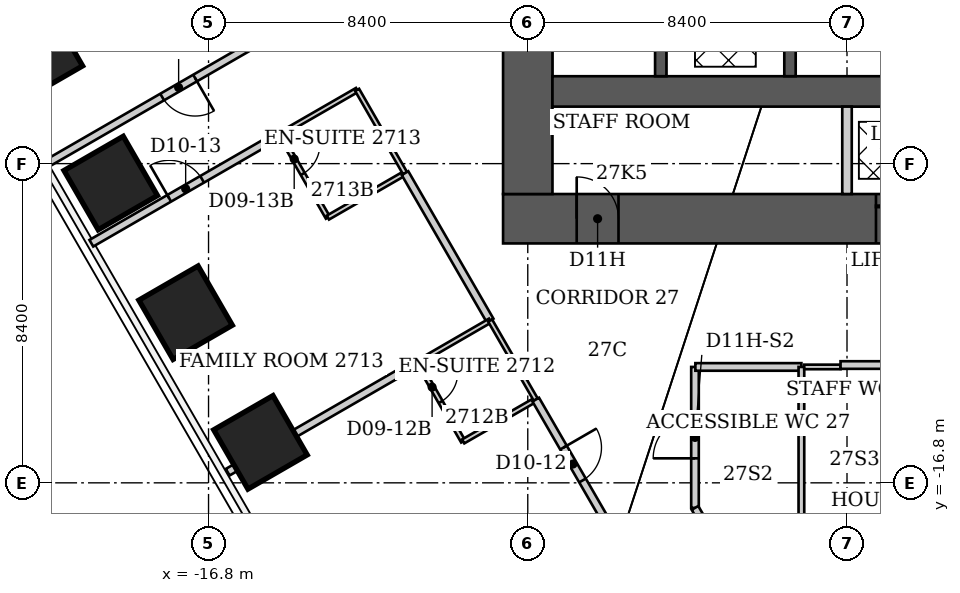
"""IFC4 building model, lengths in metres.
Left out: names, types, materials, properties, quantities, classifications, styles, units other than length and angle.
Written with IfcOpenShell. Run it as: python <this file> out.ifc"""

import sys

from ifc_helpers import new_model, si_unit, direction, frame, frame_2d, origin, origin_2d, place, context, subcontext, project, spatial, rectangle, extrude, element, fill, save


model = new_model("IFC4")
c1 = context("Model", 3, precision=1e-05, world=origin(), true_north=direction((0.0, 1.0)))
c2 = subcontext(c1, "Body", "Model", "MODEL_VIEW")
j1 = project(units=[si_unit("LENGTHUNIT", "METRE"), si_unit("PLANEANGLEUNIT", "RADIAN")], contexts=[c1])
p1 = place(None, origin())
s1 = spatial("IfcSite", under=j1, at=p1, CompositionType="ELEMENT")
p2 = place(p1, origin())
s2 = spatial("IfcBuilding", under=s1, at=p2, CompositionType="ELEMENT")
p3 = place(p2, frame((0.0, 0.0, 112.0)))
s3 = spatial("IfcBuildingStorey", under=s2, at=p3, CompositionType="ELEMENT", Elevation=112.0)
for number, where, z_axis, x_axis in (
    (1, (-15.434, -15.735, 0.0), (0.0, 0.0, 1.0), (-0.866, -0.5, 0.0)),
    (2, (-17.404, -12.323, 0.0), (0.0, 0.0, 1.0), (-0.866, -0.5, 0.0)),
    (3, (-19.374, -8.911, 0.0), (0.0, 0.0, 1.0), (-0.866, -0.5, 0.0)),
    (4, (-21.344, -5.499, 0.0), (0.0, 0.0, 1.0), (-0.866, -0.5, 0.0)),
):
    element("IfcColumn", number, at=place(p3, frame(where, z_axis=z_axis, x_axis=x_axis)), inside=s3, PredefinedType="COLUMN", context=c2, shape_type="SweptSolid", body=[
        extrude(rectangle(XDim=1.8, YDim=1.8, at=origin_2d()), origin(), (0.0, 0.0, 1.0), 3.8),
    ])
p4 = place(p3, frame((-9.05, -9.85, 0.0), z_axis=(0.0, 0.0, 1.0), x_axis=(1.0, 0.0, 0.0)))
e5 = element("IfcWall", 5, at=p4, inside=s3, PredefinedType="SHEAR", context=c2, shape_type="SweptSolid", body=[
    extrude(rectangle(XDim=18.1, YDim=1.3, at=frame_2d((9.05, 0.0))), origin(), (0.0, 0.0, 1.0), 3.8),
])
p5 = place(p4, frame((1.938, 0.0, 0.0)))
e6 = element("IfcOpeningElement", 6, at=p5, cuts=e5, PredefinedType="OPENING", context=c2, shape_type="SweptSolid", body=[
    extrude(rectangle(XDim=1.1, YDim=2.2, at=frame_2d((0.55, 1.1))), frame((0.0, 0.65, 0.0), z_axis=(0.0, -1.0, 0.0), x_axis=(1.0, 0.0, 0.0)), (0.0, 0.0, 1.0), 1.3),
])
p6 = place(p4, frame((9.812, 0.0, 0.0)))
e7 = element("IfcOpeningElement", 7, at=p6, cuts=e5, PredefinedType="OPENING", context=c2, shape_type="SweptSolid", body=[
    extrude(rectangle(XDim=1.1, YDim=2.1, at=frame_2d((0.55, 1.05))), frame((0.0, 0.65, 0.0), z_axis=(0.0, -1.0, 0.0), x_axis=(1.0, 0.0, 0.0)), (0.0, 0.0, 1.0), 1.3),
])
p7 = place(p4, frame((12.438, 0.0, 0.0)))
e8 = element("IfcOpeningElement", 8, at=p7, cuts=e5, PredefinedType="OPENING", context=c2, shape_type="SweptSolid", body=[
    extrude(rectangle(XDim=1.1, YDim=2.1, at=frame_2d((0.55, 1.05))), frame((0.0, 0.65, 0.0), z_axis=(0.0, -1.0, 0.0), x_axis=(1.0, 0.0, 0.0)), (0.0, 0.0, 1.0), 1.3),
])
p8 = place(p4, frame((15.062, 0.0, 0.0)))
e9 = element("IfcOpeningElement", 9, at=p8, cuts=e5, PredefinedType="OPENING", context=c2, shape_type="SweptSolid", body=[
    extrude(rectangle(XDim=1.1, YDim=2.1, at=frame_2d((0.55, 1.05))), frame((0.0, 0.65, 0.0), z_axis=(0.0, -1.0, 0.0), x_axis=(1.0, 0.0, 0.0)), (0.0, 0.0, 1.0), 1.3),
])
p9 = place(p3, frame((-8.4, -9.2, 0.0), z_axis=(0.0, 0.0, 1.0), x_axis=(0.0, 1.0, 0.0)))
e10 = element("IfcWall", 10, at=p9, inside=s3, PredefinedType="SHEAR", context=c2, shape_type="SweptSolid", body=[
    extrude(rectangle(XDim=15.3, YDim=1.3, at=frame_2d((7.65, 0.0))), origin(), (0.0, 0.0, 1.0), 3.8),
])
p10 = place(p9, frame((10.7, 0.0, 0.0)))
e11 = element("IfcOpeningElement", 11, at=p10, cuts=e10, PredefinedType="OPENING", context=c2, shape_type="SweptSolid", body=[
    extrude(rectangle(XDim=1.2, YDim=2.2, at=frame_2d((0.6, 1.1))), frame((0.0, 0.65, 0.0), z_axis=(0.0, -1.0, 0.0), x_axis=(1.0, 0.0, 0.0)), (0.0, 0.0, 1.0), 1.3),
])
p11 = place(p3, frame((-7.75, -6.5, 0.0), z_axis=(0.0, 0.0, 1.0), x_axis=(1.0, 0.0, 0.0)))
e12 = element("IfcWall", 12, at=p11, inside=s3, PredefinedType="SHEAR", context=c2, shape_type="SweptSolid", body=[
    extrude(rectangle(XDim=15.5, YDim=0.8, at=frame_2d((7.75, 0.0))), origin(), (0.0, 0.0, 1.0), 3.8),
])
for number, where, z_axis, x_axis in (
    (13, (-4.9, -6.1, 0.0), (0.0, 0.0, 1.0), (0.0, 1.0, 0.0)),
    (14, (-1.5, -6.1, 0.0), (0.0, 0.0, 1.0), (0.0, 1.0, 0.0)),
):
    element("IfcWall", number, at=place(p3, frame(where, z_axis=z_axis, x_axis=x_axis)), inside=s3, PredefinedType="SHEAR", context=c2, shape_type="SweptSolid", body=[
        extrude(rectangle(XDim=7.2, YDim=0.3, at=frame_2d((3.6, 0.0))), origin(), (0.0, 0.0, 1.0), 3.8),
    ])
p12 = place(p3, frame((0.0, -9.2, 0.0), z_axis=(0.0, 0.0, 1.0), x_axis=(0.0, 1.0, 0.0)))
e15 = element("IfcWall", 15, at=p12, inside=s3, PredefinedType="PARTITIONING", context=c2, shape_type="SweptSolid", body=[
    extrude(rectangle(XDim=2.3, YDim=0.25, at=frame_2d((1.15, 0.0))), origin(), (0.0, 0.0, 1.0), 3.8),
])
p13 = place(p3, frame((-19.884, -10.495, 0.0), z_axis=(0.0, 0.0, 1.0), x_axis=(0.86608558139, 0.499895754841, 0.0)))
e16 = element("IfcWall", 16, at=p13, inside=s3, PredefinedType="PARTITIONING", context=c2, shape_type="SweptSolid", body=[
    extrude(rectangle(XDim=5.732, YDim=0.2, at=frame_2d((2.866, 0.0))), origin(), (0.0, 0.0, 1.0), 3.64),
])
p14 = place(p13, frame((2.366, 0.0, 0.0)))
e17 = element("IfcOpeningElement", 17, at=p14, cuts=e16, PredefinedType="OPENING", context=c2, shape_type="SweptSolid", body=[
    extrude(rectangle(XDim=1.0, YDim=2.13, at=frame_2d((0.5, 1.065))), frame((0.0, 0.1, 0.0), z_axis=(0.0, -1.0, 0.0), x_axis=(1.0, 0.0, 0.0)), (0.0, 0.0, 1.0), 0.2),
])
p15 = place(p3, frame((-16.296, -16.52, 0.0), z_axis=(0.0, 0.0, 1.0), x_axis=(0.866035778077, 0.499982030767, 0.0)))
e18 = element("IfcWall", 18, at=p15, inside=s3, PredefinedType="PARTITIONING", context=c2, shape_type="SweptSolid", body=[
    extrude(rectangle(XDim=5.781, YDim=0.2, at=frame_2d((2.89, 0.0))), origin(), (0.0, 0.0, 1.0), 3.64),
])
p16 = place(p3, frame((-14.92, -7.63, 0.0), z_axis=(0.0, 0.0, 1.0), x_axis=(0.498665353881, -0.866794592068, 0.0)))
e19 = element("IfcWall", 19, at=p16, inside=s3, PredefinedType="PARTITIONING", context=c2, shape_type="SweptSolid", body=[
    extrude(rectangle(XDim=2.527, YDim=0.12, at=frame_2d((1.263, 0.0))), origin(), (0.0, 0.0, 1.0), 3.64),
])
p17 = place(p16, frame((0.3, 0.0, 0.0)))
e20 = element("IfcOpeningElement", 20, at=p17, cuts=e19, PredefinedType="OPENING", context=c2, shape_type="SweptSolid", body=[
    extrude(rectangle(XDim=0.9, YDim=2.03, at=frame_2d((0.45, 1.015))), frame((0.0, 0.06, 0.0), z_axis=(0.0, -1.0, 0.0), x_axis=(1.0, 0.0, 0.0)), (0.0, 0.0, 1.0), 0.12),
])
p18 = place(p3, frame((-14.92, -7.63, 0.0), z_axis=(0.0, 0.0, 1.0), x_axis=(0.866390229467, 0.499367570316, 0.0)))
e21 = element("IfcWall", 21, at=p18, inside=s3, PredefinedType="PARTITIONING", context=c2, shape_type="SweptSolid", body=[
    extrude(rectangle(XDim=2.343, YDim=0.12, at=frame_2d((1.171, 0.0))), origin(), (0.0, 0.0, 1.0), 3.64),
])
p19 = place(p3, frame((-14.09, -4.38, 0.0), z_axis=(0.0, 0.0, 1.0), x_axis=(-0.866174008169, -0.499742521277, 0.0)))
e22 = element("IfcWall", 22, at=p19, inside=s3, PredefinedType="PARTITIONING", context=c2, shape_type="SweptSolid", body=[
    extrude(rectangle(XDim=8.074, YDim=0.2, at=frame_2d((4.037, 0.0))), origin(), (0.0, 0.0, 1.0), 3.64),
])
p20 = place(p19, frame((3.537, 0.0, 0.0)))
e23 = element("IfcOpeningElement", 23, at=p20, cuts=e22, PredefinedType="OPENING", context=c2, shape_type="SweptSolid", body=[
    extrude(rectangle(XDim=1.0, YDim=2.13, at=frame_2d((0.5, 1.065))), frame((0.0, 0.1, 0.0), z_axis=(0.0, -1.0, 0.0), x_axis=(1.0, 0.0, 0.0)), (0.0, 0.0, 1.0), 0.2),
])
p21 = place(p3, frame((-13.66, -9.82, 0.0), z_axis=(0.0, 0.0, 1.0), x_axis=(0.866345142729, 0.499445786517, 0.0)))
e24 = element("IfcWall", 24, at=p21, inside=s3, PredefinedType="PARTITIONING", context=c2, shape_type="SweptSolid", body=[
    extrude(rectangle(XDim=2.343, YDim=0.12, at=frame_2d((1.171, 0.0))), origin(), (0.0, 0.0, 1.0), 3.64),
])
p22 = place(p3, frame((-12.89, -6.46, 0.0), z_axis=(0.0, 0.0, 1.0), x_axis=(0.498707120669, -0.866770562372, 0.0)))
e25 = element("IfcWall", 25, at=p22, inside=s3, PredefinedType="PARTITIONING", context=c2, shape_type="SweptSolid", body=[
    extrude(rectangle(XDim=2.527, YDim=0.12, at=frame_2d((1.263, 0.0))), origin(), (0.0, 0.0, 1.0), 3.64),
])
p23 = place(p3, frame((-11.63, -8.65, 0.0), z_axis=(0.0, 0.0, 1.0), x_axis=(0.499966166967, -0.866044936414, 0.0)))
e26 = element("IfcWall", 26, at=p23, inside=s3, PredefinedType="PARTITIONING", context=c2, shape_type="SweptSolid", body=[
    extrude(rectangle(XDim=4.48, YDim=0.2, at=frame_2d((2.24, 0.0))), origin(), (0.0, 0.0, 1.0), 3.64),
])
p24 = place(p3, frame((-11.29, -13.63, 0.0), z_axis=(0.0, 0.0, 1.0), x_axis=(0.496555799318, -0.868004803076, 0.0)))
e27 = element("IfcWall", 27, at=p24, inside=s3, PredefinedType="PARTITIONING", context=c2, shape_type="SweptSolid", body=[
    extrude(rectangle(XDim=2.396, YDim=0.12, at=frame_2d((1.198, 0.0))), origin(), (0.0, 0.0, 1.0), 3.64),
])
p25 = place(p24, frame((0.3, 0.0, 0.0)))
e28 = element("IfcOpeningElement", 28, at=p25, cuts=e27, PredefinedType="OPENING", context=c2, shape_type="SweptSolid", body=[
    extrude(rectangle(XDim=0.9, YDim=2.03, at=frame_2d((0.45, 1.015))), frame((0.0, 0.06, 0.0), z_axis=(0.0, -1.0, 0.0), x_axis=(1.0, 0.0, 0.0)), (0.0, 0.0, 1.0), 0.12),
])
p26 = place(p3, frame((-11.29, -13.63, 0.0), z_axis=(0.0, 0.0, 1.0), x_axis=(0.865444051011, 0.501005583372, 0.0)))
e29 = element("IfcWall", 29, at=p26, inside=s3, PredefinedType="PARTITIONING", context=c2, shape_type="SweptSolid", body=[
    extrude(rectangle(XDim=2.195, YDim=0.12, at=frame_2d((1.098, 0.0))), origin(), (0.0, 0.0, 1.0), 3.64),
])
p27 = place(p3, frame((-10.1, -15.71, 0.0), z_axis=(0.0, 0.0, 1.0), x_axis=(0.866609394187, 0.498987132006, 0.0)))
e30 = element("IfcWall", 30, at=p27, inside=s3, PredefinedType="PARTITIONING", context=c2, shape_type="SweptSolid", body=[
    extrude(rectangle(XDim=2.204, YDim=0.12, at=frame_2d((1.102, 0.0))), origin(), (0.0, 0.0, 1.0), 3.64),
])
p28 = place(p3, frame((-9.39, -12.53, 0.0), z_axis=(0.0, 0.0, 1.0), x_axis=(0.499737123639, -0.866177122335, 0.0)))
e31 = element("IfcWall", 31, at=p28, inside=s3, PredefinedType="PARTITIONING", context=c2, shape_type="SweptSolid", body=[
    extrude(rectangle(XDim=2.401, YDim=0.12, at=frame_2d((1.201, 0.0))), origin(), (0.0, 0.0, 1.0), 3.64),
])
p29 = place(p3, frame((-8.19, -14.61, 0.0), z_axis=(0.0, 0.0, 1.0), x_axis=(0.50053726643, -0.86571499058, 0.0)))
e32 = element("IfcWall", 32, at=p29, inside=s3, PredefinedType="PARTITIONING", context=c2, shape_type="SweptSolid", body=[
    extrude(rectangle(XDim=3.916, YDim=0.2, at=frame_2d((1.958, 0.0))), origin(), (0.0, 0.0, 1.0), 3.64),
])
p30 = place(p29, frame((1.458, 0.0, 0.0)))
e33 = element("IfcOpeningElement", 33, at=p30, cuts=e32, PredefinedType="OPENING", context=c2, shape_type="SweptSolid", body=[
    extrude(rectangle(XDim=1.0, YDim=2.13, at=frame_2d((0.5, 1.065))), frame((0.0, 0.1, 0.0), z_axis=(0.0, -1.0, 0.0), x_axis=(1.0, 0.0, 0.0)), (0.0, 0.0, 1.0), 0.2),
])
p31 = place(p3, frame((-4.0, -17.46, 0.0), z_axis=(0.0, 0.0, 1.0), x_axis=(0.0, 1.0, 0.0)))
e34 = element("IfcWall", 34, at=p31, inside=s3, PredefinedType="PARTITIONING", context=c2, shape_type="SweptSolid", body=[
    extrude(rectangle(XDim=3.71, YDim=0.2, at=frame_2d((1.855, 0.0))), origin(), (0.0, 0.0, 1.0), 2.878),
])
p32 = place(p31, frame((1.305, 0.0, 0.0)))
e35 = element("IfcOpeningElement", 35, at=p32, cuts=e34, PredefinedType="OPENING", context=c2, shape_type="SweptSolid", body=[
    extrude(rectangle(XDim=1.1, YDim=2.2, at=frame_2d((0.55, 1.1))), frame((0.0, 0.1, 0.0), z_axis=(0.0, -1.0, 0.0), x_axis=(1.0, 0.0, 0.0)), (0.0, 0.0, 1.0), 0.2),
])
p33 = place(p3, frame((-3.99, -13.75, 0.0), z_axis=(0.0, 0.0, 1.0), x_axis=(1.0, 0.0, 0.0)))
e36 = element("IfcWall", 36, at=p33, inside=s3, PredefinedType="PARTITIONING", context=c2, shape_type="SweptSolid", body=[
    extrude(rectangle(XDim=2.79, YDim=0.2, at=frame_2d((1.395, 0.0))), origin(), (0.0, 0.0, 1.0), 3.64),
])
p34 = place(p3, frame((-3.75, -17.89, 0.0), z_axis=(0.0, 0.0, 1.0), x_axis=(-0.502680181512, 0.864472460588, 0.0)))
e37 = element("IfcWall", 37, at=p34, inside=s3, PredefinedType="PARTITIONING", context=c2, shape_type="SweptSolid", body=[
    extrude(rectangle(XDim=0.497, YDim=0.2, at=frame_2d((0.249, 0.0))), origin(), (0.0, 0.0, 1.0), 3.64),
])
p35 = place(p3, frame((-1.2, -13.75, 0.0), z_axis=(0.0, 0.0, 1.0), x_axis=(0.0, -1.0, 0.0)))
e38 = element("IfcWall", 38, at=p35, inside=s3, PredefinedType="PARTITIONING", context=c2, shape_type="SweptSolid", body=[
    extrude(rectangle(XDim=4.14, YDim=0.15, at=frame_2d((2.07, 0.0))), origin(), (0.0, 0.0, 1.0), 3.64),
])
p36 = place(p3, frame((-1.125, -13.75, 0.0), z_axis=(0.0, 0.0, 1.0), x_axis=(1.0, 0.0, 0.0)))
e39 = element("IfcWall", 39, at=p36, inside=s3, PredefinedType="PARTITIONING", context=c2, shape_type="SweptSolid", body=[
    extrude(rectangle(XDim=0.955, YDim=0.12, at=frame_2d((0.478, 0.0))), origin(), (0.0, 0.0, 1.0), 3.64),
])
p37 = place(p3, frame((8.538, -13.7, 0.0), z_axis=(0.0, 0.0, 1.0), x_axis=(-1.0, 0.0, 0.0)))
e40 = element("IfcWall", 40, at=p37, inside=s3, PredefinedType="PARTITIONING", context=c2, shape_type="SweptSolid", body=[
    extrude(rectangle(XDim=8.708, YDim=0.2, at=frame_2d((4.354, 0.0))), origin(), (0.0, 0.0, 1.0), 3.64),
])
p38 = place(p37, frame((3.804, 0.0, 0.0)))
e41 = element("IfcOpeningElement", 41, at=p38, cuts=e40, PredefinedType="OPENING", context=c2, shape_type="SweptSolid", body=[
    extrude(rectangle(XDim=1.1, YDim=2.2, at=frame_2d((0.55, 1.1))), frame((0.0, 0.1, 0.0), z_axis=(0.0, -1.0, 0.0), x_axis=(1.0, 0.0, 0.0)), (0.0, 0.0, 1.0), 0.2),
])
p39 = place(p30, origin())
e42 = element("IfcDoor", 42, at=p39, inside=s3, OperationType="SINGLE_SWING_LEFT", PredefinedType="DOOR", context=c2, shape_type="SweptSolid", body=[
    extrude(rectangle(XDim=1.0, YDim=2.13, at=frame_2d((0.5, 1.065))), frame((0.0, 0.025, 0.0), z_axis=(0.0, -1.0, 0.0), x_axis=(1.0, 0.0, 0.0)), (0.0, 0.0, 1.0), 0.05),
])
fill(e33, e42)
p40 = place(p25, origin())
e43 = element("IfcDoor", 43, at=p40, inside=s3, OperationType="SINGLE_SWING_LEFT", PredefinedType="DOOR", context=c2, shape_type="SweptSolid", body=[
    extrude(rectangle(XDim=0.9, YDim=2.03, at=frame_2d((0.45, 1.015))), frame((0.0, 0.025, 0.0), z_axis=(0.0, -1.0, 0.0), x_axis=(1.0, 0.0, 0.0)), (0.0, 0.0, 1.0), 0.05),
])
fill(e28, e43)
p41 = place(p14, origin())
e44 = element("IfcDoor", 44, at=p41, inside=s3, OperationType="SINGLE_SWING_LEFT", PredefinedType="DOOR", context=c2, shape_type="SweptSolid", body=[
    extrude(rectangle(XDim=1.0, YDim=2.13, at=frame_2d((0.5, 1.065))), frame((0.0, 0.025, 0.0), z_axis=(0.0, -1.0, 0.0), x_axis=(1.0, 0.0, 0.0)), (0.0, 0.0, 1.0), 0.05),
])
fill(e17, e44)
p42 = place(p17, origin())
e45 = element("IfcDoor", 45, at=p42, inside=s3, OperationType="SINGLE_SWING_LEFT", PredefinedType="DOOR", context=c2, shape_type="SweptSolid", body=[
    extrude(rectangle(XDim=0.9, YDim=2.03, at=frame_2d((0.45, 1.015))), frame((0.0, 0.025, 0.0), z_axis=(0.0, -1.0, 0.0), x_axis=(1.0, 0.0, 0.0)), (0.0, 0.0, 1.0), 0.05),
])
fill(e20, e45)
p43 = place(p20, origin())
e46 = element("IfcDoor", 46, at=p43, inside=s3, OperationType="SINGLE_SWING_LEFT", PredefinedType="DOOR", context=c2, shape_type="SweptSolid", body=[
    extrude(rectangle(XDim=1.0, YDim=2.13, at=frame_2d((0.5, 1.065))), frame((0.0, 0.025, 0.0), z_axis=(0.0, -1.0, 0.0), x_axis=(1.0, 0.0, 0.0)), (0.0, 0.0, 1.0), 0.05),
])
fill(e23, e46)
p44 = place(p32, origin())
e47 = element("IfcDoor", 47, at=p44, inside=s3, OperationType="SINGLE_SWING_LEFT", PredefinedType="DOOR", context=c2, shape_type="SweptSolid", body=[
    extrude(rectangle(XDim=1.1, YDim=2.2, at=frame_2d((0.55, 1.1))), frame((0.0, 0.025, 0.0), z_axis=(0.0, -1.0, 0.0), x_axis=(1.0, 0.0, 0.0)), (0.0, 0.0, 1.0), 0.05),
])
fill(e35, e47)
p45 = place(p5, origin())
e48 = element("IfcDoor", 48, at=p45, inside=s3, OperationType="SINGLE_SWING_LEFT", PredefinedType="DOOR", context=c2, shape_type="SweptSolid", body=[
    extrude(rectangle(XDim=1.1, YDim=2.2, at=frame_2d((0.55, 1.1))), frame((0.0, 0.025, 0.0), z_axis=(0.0, -1.0, 0.0), x_axis=(1.0, 0.0, 0.0)), (0.0, 0.0, 1.0), 0.05),
])
fill(e6, e48)
p46 = place(p6, origin())
e49 = element("IfcDoor", 49, at=p46, inside=s3, OperationType="DOUBLE_DOOR_SLIDING", PredefinedType="DOOR", context=c2, shape_type="SweptSolid", body=[
    extrude(rectangle(XDim=1.1, YDim=2.1, at=frame_2d((0.55, 1.05))), frame((0.0, 0.025, 0.0), z_axis=(0.0, -1.0, 0.0), x_axis=(1.0, 0.0, 0.0)), (0.0, 0.0, 1.0), 0.05),
])
fill(e7, e49)
save(model, sys.argv[1])
